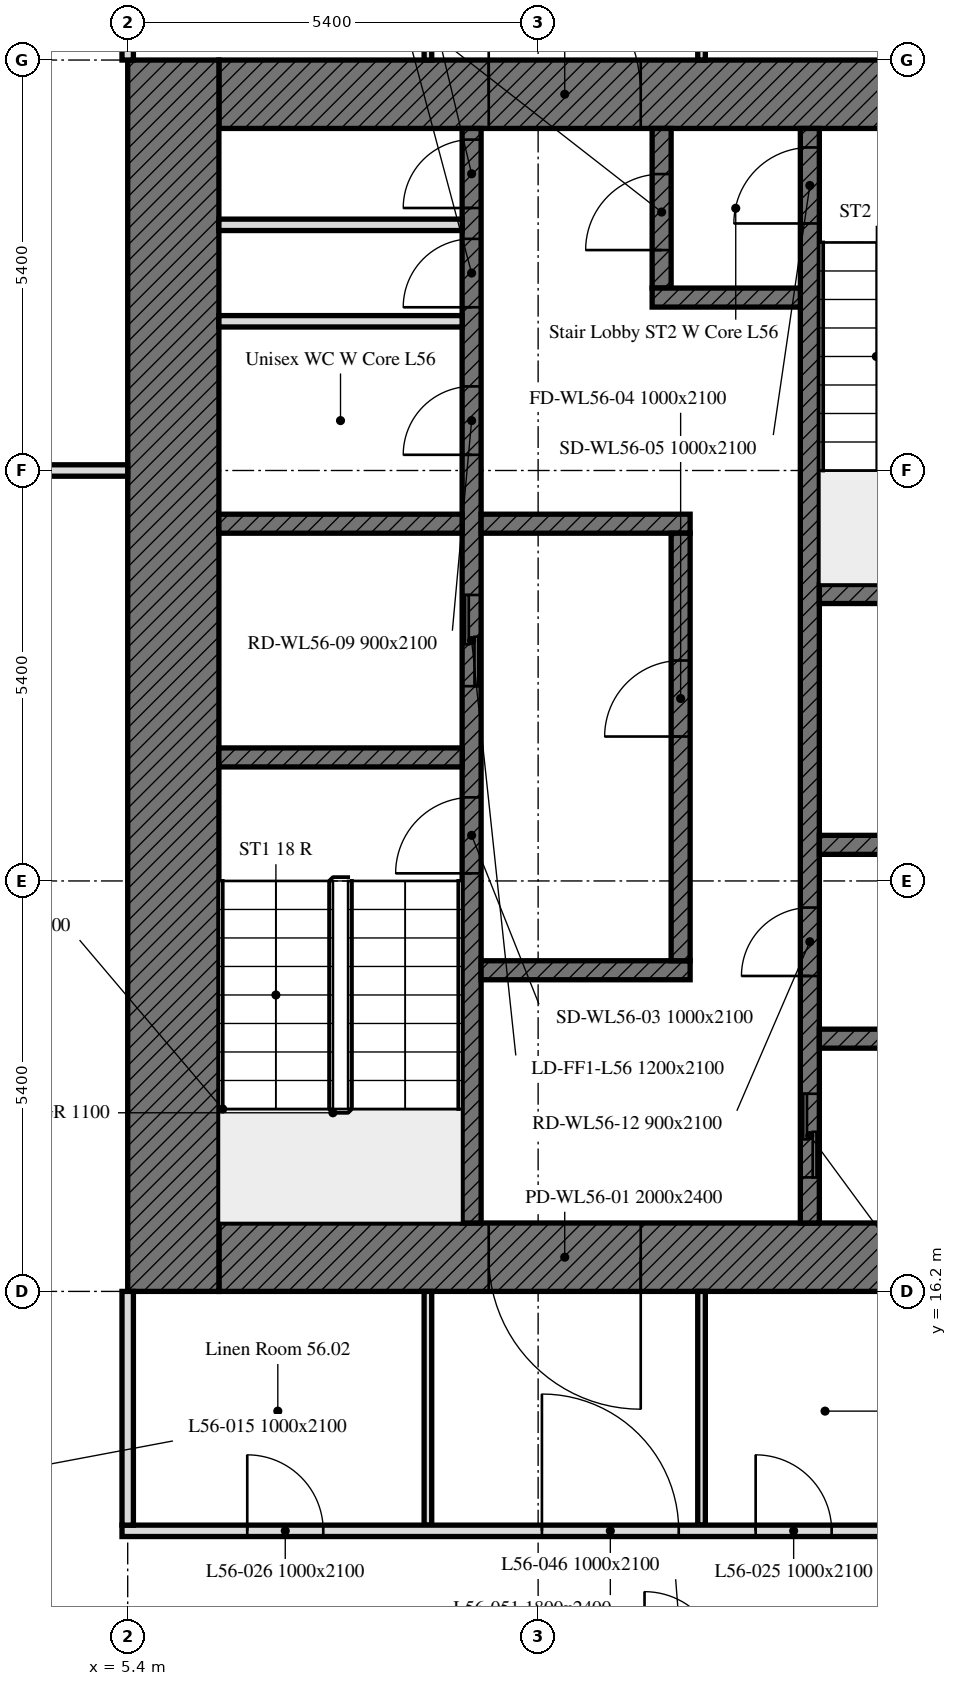
"""IFC4 building model, lengths in metres.
Left out: names, types, materials, properties, quantities, classifications, styles, units other than length and angle.
Written with IfcOpenShell. Run it as: python <this file> out.ifc"""

import sys

from ifc_helpers import new_model, si_unit, direction, frame, frame_2d, origin, place, context, subcontext, project, spatial, rectangle, extrude, element, fill, save


model = new_model("IFC4")
c1 = context("Model", 3, precision=1e-05, world=origin(), true_north=direction((0.0, 1.0)))
c2 = subcontext(c1, "Body", "Model", "MODEL_VIEW")
j1 = project(units=[si_unit("LENGTHUNIT", "METRE"), si_unit("PLANEANGLEUNIT", "RADIAN")], contexts=[c1])
p1 = place(None, origin())
s1 = spatial("IfcSite", under=j1, at=p1, CompositionType="ELEMENT")
p2 = place(p1, origin())
s2 = spatial("IfcBuilding", under=s1, at=p2, CompositionType="ELEMENT")
p3 = place(p2, frame((0.0, 0.0, 223.6)))
s3 = spatial("IfcBuildingStorey", under=s2, at=p3, CompositionType="ELEMENT", Elevation=223.6)
p4 = place(p3, frame((17.7, 16.65, 0.0), z_axis=(0.0, 0.0, 1.0), x_axis=(-1.0, 0.0, 0.0)))
e1 = element("IfcWall", 1, at=p4, inside=s3, PredefinedType="SOLIDWALL", context=c2, shape_type="SweptSolid", body=[
    extrude(rectangle(XDim=11.1, YDim=0.9, at=frame_2d((5.55, 0.0))), origin(), (0.0, 0.0, 1.0), 3.0),
])
p5 = place(p4, frame((5.55, 0.0, 0.0)))
e2 = element("IfcOpeningElement", 2, at=p5, cuts=e1, PredefinedType="OPENING", context=c2, shape_type="SweptSolid", body=[
    extrude(rectangle(XDim=2.0, YDim=2.4, at=frame_2d((1.0, 1.2))), frame((0.0, 0.45, 0.0), z_axis=(0.0, -1.0, 0.0), x_axis=(1.0, 0.0, 0.0)), (0.0, 0.0, 1.0), 0.9),
])
p6 = place(p3, frame((6.6, 31.95, 0.0), z_axis=(0.0, 0.0, 1.0), x_axis=(1.0, 0.0, 0.0)))
e3 = element("IfcWall", 3, at=p6, inside=s3, PredefinedType="SOLIDWALL", context=c2, shape_type="SweptSolid", body=[
    extrude(rectangle(XDim=11.1, YDim=0.9, at=frame_2d((5.55, 0.0))), origin(), (0.0, 0.0, 1.0), 3.0),
])
p7 = place(p6, frame((3.55, 0.0, 0.0)))
e4 = element("IfcOpeningElement", 4, at=p7, cuts=e3, PredefinedType="OPENING", context=c2, shape_type="SweptSolid", body=[
    extrude(rectangle(XDim=2.0, YDim=2.4, at=frame_2d((1.0, 1.2))), frame((0.0, 0.45, 0.0), z_axis=(0.0, -1.0, 0.0), x_axis=(1.0, 0.0, 0.0)), (0.0, 0.0, 1.0), 0.9),
])
p8 = place(p3, frame((6.0, 16.2, 0.0), z_axis=(0.0, 0.0, 1.0), x_axis=(0.0, 1.0, 0.0)))
e5 = element("IfcWall", 5, at=p8, inside=s3, PredefinedType="SOLIDWALL", context=c2, shape_type="SweptSolid", body=[
    extrude(rectangle(XDim=16.2, YDim=1.2, at=frame_2d((8.1, 0.0))), origin(), (0.0, 0.0, 1.0), 3.0),
])
p9 = place(p3, frame((9.925, 17.1, 0.0), z_axis=(0.0, 0.0, 1.0), x_axis=(0.0, 1.0, 0.0)))
e6 = element("IfcWall", 6, at=p9, inside=s3, PredefinedType="SOLIDWALL", context=c2, shape_type="SweptSolid", body=[
    extrude(rectangle(XDim=14.4, YDim=0.25, at=frame_2d((7.2, 0.0))), origin(), (0.0, 0.0, 1.0), 3.0),
])
p10 = place(p9, frame((4.6, 0.0, 0.0)))
e7 = element("IfcOpeningElement", 7, at=p10, cuts=e6, PredefinedType="OPENING", context=c2, shape_type="SweptSolid", body=[
    extrude(rectangle(XDim=1.0, YDim=2.1, at=frame_2d((0.5, 1.05))), frame((0.0, 0.125, 0.0), z_axis=(0.0, -1.0, 0.0), x_axis=(1.0, 0.0, 0.0)), (0.0, 0.0, 1.0), 0.25),
])
p11 = place(p9, frame((7.062, 0.0, 0.0)))
e8 = element("IfcOpeningElement", 8, at=p11, cuts=e6, PredefinedType="OPENING", context=c2, shape_type="SweptSolid", body=[
    extrude(rectangle(XDim=1.2, YDim=2.1, at=frame_2d((0.6, 1.05))), frame((0.0, 0.125, 0.0), z_axis=(0.0, -1.0, 0.0), x_axis=(1.0, 0.0, 0.0)), (0.0, 0.0, 1.0), 0.25),
])
p12 = place(p9, frame((10.106, 0.0, 0.0)))
e9 = element("IfcOpeningElement", 9, at=p12, cuts=e6, PredefinedType="OPENING", context=c2, shape_type="SweptSolid", body=[
    extrude(rectangle(XDim=0.9, YDim=2.1, at=frame_2d((0.45, 1.05))), frame((0.0, 0.125, 0.0), z_axis=(0.0, -1.0, 0.0), x_axis=(1.0, 0.0, 0.0)), (0.0, 0.0, 1.0), 0.25),
])
p13 = place(p9, frame((12.048, 0.0, 0.0)))
e10 = element("IfcOpeningElement", 10, at=p13, cuts=e6, PredefinedType="OPENING", context=c2, shape_type="SweptSolid", body=[
    extrude(rectangle(XDim=0.9, YDim=2.1, at=frame_2d((0.45, 1.05))), frame((0.0, 0.125, 0.0), z_axis=(0.0, -1.0, 0.0), x_axis=(1.0, 0.0, 0.0)), (0.0, 0.0, 1.0), 0.25),
])
p14 = place(p9, frame((13.354, 0.0, 0.0)))
e11 = element("IfcOpeningElement", 11, at=p14, cuts=e6, PredefinedType="OPENING", context=c2, shape_type="SweptSolid", body=[
    extrude(rectangle(XDim=0.9, YDim=2.1, at=frame_2d((0.45, 1.05))), frame((0.0, 0.125, 0.0), z_axis=(0.0, -1.0, 0.0), x_axis=(1.0, 0.0, 0.0)), (0.0, 0.0, 1.0), 0.25),
])
p15 = place(p3, frame((14.375, 17.1, 0.0), z_axis=(0.0, 0.0, 1.0), x_axis=(0.0, 1.0, 0.0)))
e12 = element("IfcWall", 12, at=p15, inside=s3, PredefinedType="SOLIDWALL", context=c2, shape_type="SweptSolid", body=[
    extrude(rectangle(XDim=14.4, YDim=0.25, at=frame_2d((7.2, 0.0))), origin(), (0.0, 0.0, 1.0), 3.0),
])
p16 = place(p15, frame((13.15, 0.0, 0.0)))
e13 = element("IfcOpeningElement", 13, at=p16, cuts=e12, PredefinedType="OPENING", context=c2, shape_type="SweptSolid", body=[
    extrude(rectangle(XDim=1.0, YDim=2.1, at=frame_2d((0.5, 1.05))), frame((0.0, 0.125, 0.0), z_axis=(0.0, -1.0, 0.0), x_axis=(1.0, 0.0, 0.0)), (0.0, 0.0, 1.0), 0.25),
])
p17 = place(p15, frame((0.6, 0.0, 0.0)))
e14 = element("IfcOpeningElement", 14, at=p17, cuts=e12, PredefinedType="OPENING", context=c2, shape_type="SweptSolid", body=[
    extrude(rectangle(XDim=1.1, YDim=2.1, at=frame_2d((0.55, 1.05))), frame((0.0, 0.125, 0.0), z_axis=(0.0, -1.0, 0.0), x_axis=(1.0, 0.0, 0.0)), (0.0, 0.0, 1.0), 0.25),
])
p18 = place(p15, frame((3.25, 0.0, 0.0)))
e15 = element("IfcOpeningElement", 15, at=p18, cuts=e12, PredefinedType="OPENING", context=c2, shape_type="SweptSolid", body=[
    extrude(rectangle(XDim=0.9, YDim=2.1, at=frame_2d((0.45, 1.05))), frame((0.0, 0.125, 0.0), z_axis=(0.0, -1.0, 0.0), x_axis=(1.0, 0.0, 0.0)), (0.0, 0.0, 1.0), 0.25),
])
for number, where, z_axis, x_axis in (
    (16, (6.6, 23.225, 0.0), (0.0, 0.0, 1.0), (1.0, 0.0, 0.0)),
    (17, (14.5, 25.375, 0.0), (0.0, 0.0, 1.0), (1.0, 0.0, 0.0)),
    (18, (14.5, 22.075, 0.0), (0.0, 0.0, 1.0), (1.0, 0.0, 0.0)),
    (19, (6.6, 26.3, 0.0), (0.0, 0.0, 1.0), (1.0, 0.0, 0.0)),
):
    element("IfcWall", number, at=place(p3, frame(where, z_axis=z_axis, x_axis=x_axis)), inside=s3, PredefinedType="SOLIDWALL", context=c2, shape_type="SweptSolid", body=[
        extrude(rectangle(XDim=3.2, YDim=0.25, at=frame_2d((1.6, 0.0))), origin(), (0.0, 0.0, 1.0), 3.0),
    ])
for number, where, z_axis, x_axis in (
    (20, (10.05, 26.3, 0.0), (0.0, 0.0, 1.0), (1.0, 0.0, 0.0)),
    (21, (10.05, 20.425, 0.0), (0.0, 0.0, 1.0), (1.0, 0.0, 0.0)),
):
    element("IfcWall", number, at=place(p3, frame(where, z_axis=z_axis, x_axis=x_axis)), inside=s3, PredefinedType="SOLIDWALL", context=c2, shape_type="SweptSolid", body=[
        extrude(rectangle(XDim=2.75, YDim=0.25, at=frame_2d((1.375, 0.0))), origin(), (0.0, 0.0, 1.0), 3.0),
    ])
p19 = place(p3, frame((12.425, 29.4, 0.0), z_axis=(0.0, 0.0, 1.0), x_axis=(0.0, 1.0, 0.0)))
e22 = element("IfcWall", 22, at=p19, inside=s3, PredefinedType="SOLIDWALL", context=c2, shape_type="SweptSolid", body=[
    extrude(rectangle(XDim=2.1, YDim=0.25, at=frame_2d((1.05, 0.0))), origin(), (0.0, 0.0, 1.0), 3.0),
])
p20 = place(p19, frame((0.5, 0.0, 0.0)))
e23 = element("IfcOpeningElement", 23, at=p20, cuts=e22, PredefinedType="OPENING", context=c2, shape_type="SweptSolid", body=[
    extrude(rectangle(XDim=1.0, YDim=2.1, at=frame_2d((0.5, 1.05))), frame((0.0, 0.125, 0.0), z_axis=(0.0, -1.0, 0.0), x_axis=(1.0, 0.0, 0.0)), (0.0, 0.0, 1.0), 0.25),
])
p21 = place(p3, frame((12.3, 29.275, 0.0), z_axis=(0.0, 0.0, 1.0), x_axis=(1.0, 0.0, 0.0)))
e24 = element("IfcWall", 24, at=p21, inside=s3, PredefinedType="SOLIDWALL", context=c2, shape_type="SweptSolid", body=[
    extrude(rectangle(XDim=1.95, YDim=0.25, at=frame_2d((0.975, 0.0))), origin(), (0.0, 0.0, 1.0), 3.0),
])
p22 = place(p3, frame((12.675, 20.55, 0.0), z_axis=(0.0, 0.0, 1.0), x_axis=(0.0, 1.0, 0.0)))
e25 = element("IfcWall", 25, at=p22, inside=s3, PredefinedType="SOLIDWALL", context=c2, shape_type="SweptSolid", body=[
    extrude(rectangle(XDim=5.625, YDim=0.25, at=frame_2d((2.812, 0.0))), origin(), (0.0, 0.0, 1.0), 3.0),
])
p23 = place(p22, frame((2.95, 0.0, 0.0)))
e26 = element("IfcOpeningElement", 26, at=p23, cuts=e25, PredefinedType="OPENING", context=c2, shape_type="SweptSolid", body=[
    extrude(rectangle(XDim=1.0, YDim=2.1, at=frame_2d((0.5, 1.05))), frame((0.0, 0.125, 0.0), z_axis=(0.0, -1.0, 0.0), x_axis=(1.0, 0.0, 0.0)), (0.0, 0.0, 1.0), 0.25),
])
p24 = place(p3, frame((14.5, 19.525, 0.0), z_axis=(0.0, 0.0, 1.0), x_axis=(1.0, 0.0, 0.0)))
e27 = element("IfcWall", 27, at=p24, inside=s3, PredefinedType="SOLIDWALL", context=c2, shape_type="SweptSolid", body=[
    extrude(rectangle(XDim=3.2, YDim=0.25, at=frame_2d((1.6, 0.0))), origin(), (0.0, 0.0, 1.0), 3.0),
])
for number, where, z_axis, x_axis in (
    (28, (6.6, 28.963, 0.0), (0.0, 0.0, 1.0), (1.0, 0.0, 0.0)),
    (29, (6.6, 30.232, 0.0), (0.0, 0.0, 1.0), (1.0, 0.0, 0.0)),
):
    element("IfcWall", number, at=place(p3, frame(where, z_axis=z_axis, x_axis=x_axis)), inside=s3, PredefinedType="PARTITIONING", context=c2, shape_type="SweptSolid", body=[
        extrude(rectangle(XDim=3.2, YDim=0.15, at=frame_2d((1.6, 0.0))), origin(), (0.0, 0.0, 1.0), 3.0),
    ])
for number, where, z_axis, x_axis in (
    (30, (12.95, 32.4, 0.0), (0.0, 0.0, 1.0), (0.0, 1.0, 0.0)),
    (31, (9.35, 39.525, 0.0), (0.0, 0.0, 1.0), (0.0, -1.0, 0.0)),
):
    element("IfcWall", number, at=place(p3, frame(where, z_axis=z_axis, x_axis=x_axis)), inside=s3, PredefinedType="PARTITIONING", context=c2, shape_type="SweptSolid", body=[
        extrude(rectangle(XDim=7.125, YDim=0.1, at=frame_2d((3.562, 0.0))), origin(), (0.0, 0.0, 1.0), 2.4),
    ])
p25 = place(p3, frame((3.375, 27.0, 0.0), z_axis=(0.0, 0.0, 1.0), x_axis=(1.0, 0.0, 0.0)))
e32 = element("IfcWall", 32, at=p25, inside=s3, PredefinedType="PARTITIONING", context=c2, shape_type="SweptSolid", body=[
    extrude(rectangle(XDim=2.025, YDim=0.15, at=frame_2d((1.012, 0.0))), origin(), (0.0, 0.0, 1.0), 2.4),
])
p26 = place(p3, frame((5.4, 32.4, 0.0), z_axis=(0.0, 0.0, 1.0), x_axis=(0.0, 1.0, 0.0)))
e33 = element("IfcWall", 33, at=p26, inside=s3, PredefinedType="PARTITIONING", context=c2, shape_type="SweptSolid", body=[
    extrude(rectangle(XDim=5.005, YDim=0.15, at=frame_2d((2.502, 0.0))), origin(), (0.0, 0.0, 1.0), 3.0),
])
p27 = place(p26, frame((1.7, 0.0, 0.0)))
e34 = element("IfcOpeningElement", 34, at=p27, cuts=e33, PredefinedType="OPENING", context=c2, shape_type="SweptSolid", body=[
    extrude(rectangle(XDim=1.0, YDim=2.1, at=frame_2d((0.5, 1.05))), frame((0.0, 0.075, 0.0), z_axis=(0.0, -1.0, 0.0), x_axis=(1.0, 0.0, 0.0)), (0.0, 0.0, 1.0), 0.15),
])
for number, where, z_axis, x_axis in (
    (35, (12.95, 13.125, 0.0), (0.0, 0.0, 1.0), (0.0, 1.0, 0.0)),
    (36, (9.35, 16.2, 0.0), (0.0, 0.0, 1.0), (0.0, -1.0, 0.0)),
):
    element("IfcWall", number, at=place(p3, frame(where, z_axis=z_axis, x_axis=x_axis)), inside=s3, PredefinedType="PARTITIONING", context=c2, shape_type="SweptSolid", body=[
        extrude(rectangle(XDim=3.075, YDim=0.1, at=frame_2d((1.538, 0.0))), origin(), (0.0, 0.0, 1.0), 3.0),
    ])
p28 = place(p3, frame((5.325, 13.05, 0.0), z_axis=(0.0, 0.0, 1.0), x_axis=(1.0, 0.0, 0.0)))
e37 = element("IfcWall", 37, at=p28, inside=s3, PredefinedType="PARTITIONING", context=c2, shape_type="SweptSolid", body=[
    extrude(rectangle(XDim=37.124, YDim=0.15, at=frame_2d((18.562, 0.0))), origin(), (0.0, 0.0, 1.0), 3.0),
])
p29 = place(p28, frame((23.875, 0.0, 0.0)))
e38 = element("IfcOpeningElement", 38, at=p29, cuts=e37, PredefinedType="OPENING", context=c2, shape_type="SweptSolid", body=[
    extrude(rectangle(XDim=1.0, YDim=2.1, at=frame_2d((0.5, 1.05))), frame((0.0, 0.075, 0.0), z_axis=(0.0, -1.0, 0.0), x_axis=(1.0, 0.0, 0.0)), (0.0, 0.0, 1.0), 0.15),
])
p30 = place(p28, frame((13.475, 0.0, 0.0)))
e39 = element("IfcOpeningElement", 39, at=p30, cuts=e37, PredefinedType="OPENING", context=c2, shape_type="SweptSolid", body=[
    extrude(rectangle(XDim=1.0, YDim=2.1, at=frame_2d((0.5, 1.05))), frame((0.0, 0.075, 0.0), z_axis=(0.0, -1.0, 0.0), x_axis=(1.0, 0.0, 0.0)), (0.0, 0.0, 1.0), 0.15),
])
p31 = place(p28, frame((34.095, 0.0, 0.0)))
e40 = element("IfcOpeningElement", 40, at=p31, cuts=e37, PredefinedType="OPENING", context=c2, shape_type="SweptSolid", body=[
    extrude(rectangle(XDim=1.0, YDim=2.1, at=frame_2d((0.5, 1.05))), frame((0.0, 0.075, 0.0), z_axis=(0.0, -1.0, 0.0), x_axis=(1.0, 0.0, 0.0)), (0.0, 0.0, 1.0), 0.15),
])
p32 = place(p28, frame((8.337, 0.0, 0.0)))
e41 = element("IfcOpeningElement", 41, at=p32, cuts=e37, PredefinedType="OPENING", context=c2, shape_type="SweptSolid", body=[
    extrude(rectangle(XDim=1.0, YDim=2.1, at=frame_2d((0.5, 1.05))), frame((0.0, 0.075, 0.0), z_axis=(0.0, -1.0, 0.0), x_axis=(1.0, 0.0, 0.0)), (0.0, 0.0, 1.0), 0.15),
])
p33 = place(p28, frame((1.648, 0.0, 0.0)))
e42 = element("IfcOpeningElement", 42, at=p33, cuts=e37, PredefinedType="OPENING", context=c2, shape_type="SweptSolid", body=[
    extrude(rectangle(XDim=1.0, YDim=2.1, at=frame_2d((0.5, 1.05))), frame((0.0, 0.075, 0.0), z_axis=(0.0, -1.0, 0.0), x_axis=(1.0, 0.0, 0.0)), (0.0, 0.0, 1.0), 0.15),
])
p34 = place(p28, frame((28.613, 0.0, 0.0)))
e43 = element("IfcOpeningElement", 43, at=p34, cuts=e37, PredefinedType="OPENING", context=c2, shape_type="SweptSolid", body=[
    extrude(rectangle(XDim=1.0, YDim=2.1, at=frame_2d((0.5, 1.05))), frame((0.0, 0.075, 0.0), z_axis=(0.0, -1.0, 0.0), x_axis=(1.0, 0.0, 0.0)), (0.0, 0.0, 1.0), 0.15),
])
p35 = place(p28, frame((30.625, 0.0, 0.0)))
e44 = element("IfcOpeningElement", 44, at=p35, cuts=e37, PredefinedType="OPENING", context=c2, shape_type="SweptSolid", body=[
    extrude(rectangle(XDim=1.8, YDim=2.4, at=frame_2d((0.9, 1.2))), frame((0.0, 0.075, 0.0), z_axis=(0.0, -1.0, 0.0), x_axis=(1.0, 0.0, 0.0)), (0.0, 0.0, 1.0), 0.15),
])
p36 = place(p28, frame((5.525, 0.0, 0.0)))
e45 = element("IfcOpeningElement", 45, at=p36, cuts=e37, PredefinedType="OPENING", context=c2, shape_type="SweptSolid", body=[
    extrude(rectangle(XDim=1.8, YDim=2.4, at=frame_2d((0.9, 1.2))), frame((0.0, 0.075, 0.0), z_axis=(0.0, -1.0, 0.0), x_axis=(1.0, 0.0, 0.0)), (0.0, 0.0, 1.0), 0.15),
])
p37 = place(p3, frame((5.4, 13.125, 0.0), z_axis=(0.0, 0.0, 1.0), x_axis=(0.0, 1.0, 0.0)))
e46 = element("IfcWall", 46, at=p37, inside=s3, PredefinedType="PARTITIONING", context=c2, shape_type="SweptSolid", body=[
    extrude(rectangle(XDim=3.075, YDim=0.15, at=frame_2d((1.538, 0.0))), origin(), (0.0, 0.0, 1.0), 3.0),
])
p38 = place(p5, origin())
e47 = element("IfcDoor", 47, at=p38, inside=s3, OperationType="DOUBLE_DOOR_SINGLE_SWING", PredefinedType="DOOR", context=c2, shape_type="SweptSolid", body=[
    extrude(rectangle(XDim=2.0, YDim=2.4, at=frame_2d((1.0, 1.2))), frame((0.0, 0.025, 0.0), z_axis=(0.0, -1.0, 0.0), x_axis=(1.0, 0.0, 0.0)), (0.0, 0.0, 1.0), 0.05),
])
fill(e2, e47)
p39 = place(p7, origin())
e48 = element("IfcDoor", 48, at=p39, inside=s3, OperationType="DOUBLE_DOOR_SINGLE_SWING", PredefinedType="DOOR", context=c2, shape_type="SweptSolid", body=[
    extrude(rectangle(XDim=2.0, YDim=2.4, at=frame_2d((1.0, 1.2))), frame((0.0, 0.025, 0.0), z_axis=(0.0, -1.0, 0.0), x_axis=(1.0, 0.0, 0.0)), (0.0, 0.0, 1.0), 0.05),
])
fill(e4, e48)
p40 = place(p10, origin())
e49 = element("IfcDoor", 49, at=p40, inside=s3, OperationType="SINGLE_SWING_LEFT", PredefinedType="DOOR", context=c2, shape_type="SweptSolid", body=[
    extrude(rectangle(XDim=1.0, YDim=2.1, at=frame_2d((0.5, 1.05))), frame((0.0, 0.025, 0.0), z_axis=(0.0, -1.0, 0.0), x_axis=(1.0, 0.0, 0.0)), (0.0, 0.0, 1.0), 0.05),
])
fill(e7, e49)
p41 = place(p23, origin())
e50 = element("IfcDoor", 50, at=p41, inside=s3, OperationType="SINGLE_SWING_LEFT", PredefinedType="DOOR", context=c2, shape_type="SweptSolid", body=[
    extrude(rectangle(XDim=1.0, YDim=2.1, at=frame_2d((0.5, 1.05))), frame((0.0, 0.025, 0.0), z_axis=(0.0, -1.0, 0.0), x_axis=(1.0, 0.0, 0.0)), (0.0, 0.0, 1.0), 0.05),
])
fill(e26, e50)
p42 = place(p16, origin())
e51 = element("IfcDoor", 51, at=p42, inside=s3, OperationType="SINGLE_SWING_LEFT", PredefinedType="DOOR", context=c2, shape_type="SweptSolid", body=[
    extrude(rectangle(XDim=1.0, YDim=2.1, at=frame_2d((0.5, 1.05))), frame((0.0, 0.025, 0.0), z_axis=(0.0, -1.0, 0.0), x_axis=(1.0, 0.0, 0.0)), (0.0, 0.0, 1.0), 0.05),
])
fill(e13, e51)
p43 = place(p20, origin())
e52 = element("IfcDoor", 52, at=p43, inside=s3, OperationType="SINGLE_SWING_LEFT", PredefinedType="DOOR", context=c2, shape_type="SweptSolid", body=[
    extrude(rectangle(XDim=1.0, YDim=2.1, at=frame_2d((0.5, 1.05))), frame((0.0, 0.025, 0.0), z_axis=(0.0, -1.0, 0.0), x_axis=(1.0, 0.0, 0.0)), (0.0, 0.0, 1.0), 0.05),
])
fill(e23, e52)
p44 = place(p11, origin())
e53 = element("IfcDoor", 53, at=p44, inside=s3, OperationType="DOUBLE_DOOR_SLIDING", PredefinedType="DOOR", context=c2, shape_type="SweptSolid", body=[
    extrude(rectangle(XDim=1.2, YDim=2.1, at=frame_2d((0.6, 1.05))), frame((0.0, 0.025, 0.0), z_axis=(0.0, -1.0, 0.0), x_axis=(1.0, 0.0, 0.0)), (0.0, 0.0, 1.0), 0.05),
])
fill(e8, e53)
p45 = place(p17, origin())
e54 = element("IfcDoor", 54, at=p45, inside=s3, OperationType="DOUBLE_DOOR_SLIDING", PredefinedType="DOOR", context=c2, shape_type="SweptSolid", body=[
    extrude(rectangle(XDim=1.1, YDim=2.1, at=frame_2d((0.55, 1.05))), frame((0.0, 0.025, 0.0), z_axis=(0.0, -1.0, 0.0), x_axis=(1.0, 0.0, 0.0)), (0.0, 0.0, 1.0), 0.05),
])
fill(e14, e54)
p46 = place(p12, origin())
e55 = element("IfcDoor", 55, at=p46, inside=s3, OperationType="SINGLE_SWING_LEFT", PredefinedType="DOOR", context=c2, shape_type="SweptSolid", body=[
    extrude(rectangle(XDim=0.9, YDim=2.1, at=frame_2d((0.45, 1.05))), frame((0.0, 0.025, 0.0), z_axis=(0.0, -1.0, 0.0), x_axis=(1.0, 0.0, 0.0)), (0.0, 0.0, 1.0), 0.05),
])
fill(e9, e55)
p47 = place(p13, origin())
e56 = element("IfcDoor", 56, at=p47, inside=s3, OperationType="SINGLE_SWING_LEFT", PredefinedType="DOOR", context=c2, shape_type="SweptSolid", body=[
    extrude(rectangle(XDim=0.9, YDim=2.1, at=frame_2d((0.45, 1.05))), frame((0.0, 0.025, 0.0), z_axis=(0.0, -1.0, 0.0), x_axis=(1.0, 0.0, 0.0)), (0.0, 0.0, 1.0), 0.05),
])
fill(e10, e56)
p48 = place(p14, origin())
e57 = element("IfcDoor", 57, at=p48, inside=s3, OperationType="SINGLE_SWING_LEFT", PredefinedType="DOOR", context=c2, shape_type="SweptSolid", body=[
    extrude(rectangle(XDim=0.9, YDim=2.1, at=frame_2d((0.45, 1.05))), frame((0.0, 0.025, 0.0), z_axis=(0.0, -1.0, 0.0), x_axis=(1.0, 0.0, 0.0)), (0.0, 0.0, 1.0), 0.05),
])
fill(e11, e57)
p49 = place(p18, origin())
e58 = element("IfcDoor", 58, at=p49, inside=s3, OperationType="SINGLE_SWING_LEFT", PredefinedType="DOOR", context=c2, shape_type="SweptSolid", body=[
    extrude(rectangle(XDim=0.9, YDim=2.1, at=frame_2d((0.45, 1.05))), frame((0.0, 0.025, 0.0), z_axis=(0.0, -1.0, 0.0), x_axis=(1.0, 0.0, 0.0)), (0.0, 0.0, 1.0), 0.05),
])
fill(e15, e58)
p50 = place(p32, origin())
e59 = element("IfcDoor", 59, at=p50, inside=s3, OperationType="SINGLE_SWING_LEFT", PredefinedType="DOOR", context=c2, shape_type="SweptSolid", body=[
    extrude(rectangle(XDim=1.0, YDim=2.1, at=frame_2d((0.5, 1.05))), frame((0.0, 0.025, 0.0), z_axis=(0.0, -1.0, 0.0), x_axis=(1.0, 0.0, 0.0)), (0.0, 0.0, 1.0), 0.05),
])
fill(e41, e59)
p51 = place(p33, origin())
e60 = element("IfcDoor", 60, at=p51, inside=s3, OperationType="SINGLE_SWING_RIGHT", PredefinedType="DOOR", context=c2, shape_type="SweptSolid", body=[
    extrude(rectangle(XDim=1.0, YDim=2.1, at=frame_2d((0.5, 1.05))), frame((0.0, 0.025, 0.0), z_axis=(0.0, -1.0, 0.0), x_axis=(1.0, 0.0, 0.0)), (0.0, 0.0, 1.0), 0.05),
])
fill(e42, e60)
p52 = place(p36, origin())
e61 = element("IfcDoor", 61, at=p52, inside=s3, OperationType="DOUBLE_DOOR_SINGLE_SWING", PredefinedType="DOOR", context=c2, shape_type="SweptSolid", body=[
    extrude(rectangle(XDim=1.8, YDim=2.4, at=frame_2d((0.9, 1.2))), frame((0.0, 0.025, 0.0), z_axis=(0.0, -1.0, 0.0), x_axis=(1.0, 0.0, 0.0)), (0.0, 0.0, 1.0), 0.05),
])
fill(e45, e61)
save(model, sys.argv[1])
